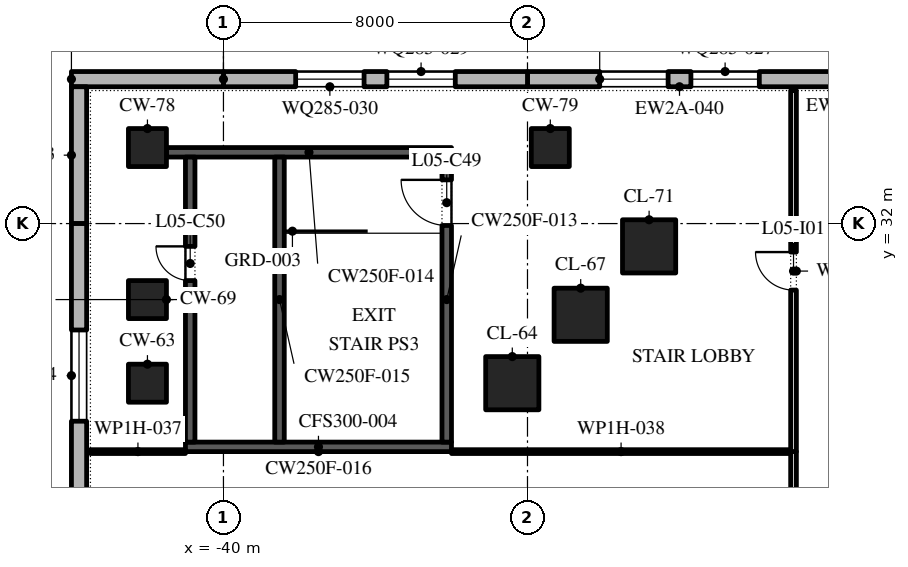
"""IFC4 building model, lengths in metres.
Left out: names, types, materials, properties, quantities, classifications, styles, units other than length and angle.
Written with IfcOpenShell. Run it as: python <this file> out.ifc"""

import sys

from ifc_helpers import new_model, si_unit, direction, frame, frame_2d, origin, origin_2d, place, context, subcontext, project, spatial, polyline, rectangle, outline, extrude, element, fill, save


model = new_model("IFC4")
c1 = context("Model", 3, precision=1e-05, world=origin(), true_north=direction((0.0, 1.0)))
c2 = subcontext(c1, "Body", "Model", "MODEL_VIEW")
j1 = project(units=[si_unit("LENGTHUNIT", "METRE"), si_unit("PLANEANGLEUNIT", "RADIAN")], contexts=[c1])
p1 = place(None, origin())
s1 = spatial("IfcSite", under=j1, at=p1, CompositionType="ELEMENT")
p2 = place(p1, origin())
s2 = spatial("IfcBuilding", under=s1, at=p2, CompositionType="ELEMENT")
p3 = place(p2, frame((0.0, 0.0, 28.8)))
s3 = spatial("IfcBuildingStorey", under=s2, at=p3, CompositionType="ELEMENT", Elevation=28.8)
p4 = place(p3, frame((-42.0, 27.8, 0.0), z_axis=(0.0, 0.0, 1.0), x_axis=(1.0, 0.0, 0.0)))
e1 = element("IfcColumn", 1, at=p4, inside=s3, PredefinedType="COLUMN", context=c2, shape_type="SweptSolid", body=[
    extrude(rectangle(XDim=1.0, YDim=1.0, at=origin_2d()), origin(), (0.0, 0.0, 1.0), 4.35),
])
for number, where, z_axis, x_axis in (
    (2, (-32.4, 27.8, 0.0), (0.0, 0.0, 1.0), (1.0, 0.0, 0.0)),
    (3, (-30.6, 29.6, 0.0), (0.0, 0.0, 1.0), (1.0, 0.0, 0.0)),
):
    element("IfcColumn", number, at=place(p3, frame(where, z_axis=z_axis, x_axis=x_axis)), inside=s3, PredefinedType="COLUMN", context=c2, shape_type="SweptSolid", body=[
        extrude(rectangle(XDim=1.4, YDim=1.4, at=origin_2d()), origin(), (0.0, 0.0, 1.0), 4.8),
    ])
p5 = place(p3, frame((-42.0, 30.0, 0.0), z_axis=(0.0, 0.0, 1.0), x_axis=(1.0, 0.0, 0.0)))
e4 = element("IfcColumn", 4, at=p5, inside=s3, PredefinedType="COLUMN", context=c2, shape_type="SweptSolid", body=[
    extrude(rectangle(XDim=1.0, YDim=1.0, at=origin_2d()), origin(), (0.0, 0.0, 1.0), 4.35),
])
p6 = place(p3, frame((-28.8, 31.4, 0.0), z_axis=(0.0, 0.0, 1.0), x_axis=(1.0, 0.0, 0.0)))
e5 = element("IfcColumn", 5, at=p6, inside=s3, PredefinedType="COLUMN", context=c2, shape_type="SweptSolid", body=[
    extrude(rectangle(XDim=1.4, YDim=1.4, at=origin_2d()), origin(), (0.0, 0.0, 1.0), 4.8),
])
for number, where, z_axis, x_axis in (
    (6, (-42.0, 34.0, 0.0), (0.0, 0.0, 1.0), (1.0, 0.0, 0.0)),
    (7, (-31.4, 34.0, 0.0), (0.0, 0.0, 1.0), (1.0, 0.0, 0.0)),
):
    element("IfcColumn", number, at=place(p3, frame(where, z_axis=z_axis, x_axis=x_axis)), inside=s3, PredefinedType="COLUMN", context=c2, shape_type="SweptSolid", body=[
        extrude(rectangle(XDim=1.0, YDim=1.0, at=origin_2d()), origin(), (0.0, 0.0, 1.0), 4.35),
    ])
p7 = place(p3, frame((-24.0, 35.8, 0.0), z_axis=(0.0, 0.0, 1.0), x_axis=(-1.0, 0.0, 0.0)))
e8 = element("IfcWall", 8, at=p7, inside=s3, PredefinedType="STANDARD", context=c2, shape_type="SweptSolid", body=[
    extrude(rectangle(XDim=8.0, YDim=0.4, at=frame_2d((4.0, 0.0))), origin(), (0.0, 0.0, 1.0), 4.35),
])
p8 = place(p7, frame((1.9, 0.0, 0.9)))
e9 = element("IfcOpeningElement", 9, at=p8, cuts=e8, PredefinedType="OPENING", context=c2, shape_type="SweptSolid", body=[
    extrude(outline(polyline([(0.0, 0.0), (1.8, 0.0), (1.8, 1.425), (1.784, 1.646), (1.738, 1.864), (1.661, 2.072), (1.556, 2.268), (1.425, 2.447), (1.269, 2.605), (1.093, 2.741), (0.9, 2.85), (0.707, 2.741), (0.531, 2.605), (0.375, 2.447), (0.244, 2.268), (0.139, 2.072), (0.062, 1.864), (0.016, 1.646), (0.0, 1.425), (0.0, 0.0)])), frame((0.0, 0.21, 0.0), z_axis=(0.0, -1.0, 0.0), x_axis=(1.0, 0.0, 0.0)), (0.0, 0.0, 1.0), 0.42),
])
p9 = place(p7, frame((4.3, 0.0, 0.9)))
e10 = element("IfcOpeningElement", 10, at=p9, cuts=e8, PredefinedType="OPENING", context=c2, shape_type="SweptSolid", body=[
    extrude(outline(polyline([(0.0, 0.0), (1.8, 0.0), (1.8, 1.425), (1.784, 1.646), (1.738, 1.864), (1.661, 2.072), (1.556, 2.268), (1.425, 2.447), (1.269, 2.605), (1.093, 2.741), (0.9, 2.85), (0.707, 2.741), (0.531, 2.605), (0.375, 2.447), (0.244, 2.268), (0.139, 2.072), (0.062, 1.864), (0.016, 1.646), (0.0, 1.425), (0.0, 0.0)])), frame((0.0, 0.21, 0.0), z_axis=(0.0, -1.0, 0.0), x_axis=(1.0, 0.0, 0.0)), (0.0, 0.0, 1.0), 0.42),
])
p10 = place(p3, frame((-32.0, 35.8, 0.0), z_axis=(0.0, 0.0, 1.0), x_axis=(-1.0, 0.0, 0.0)))
e11 = element("IfcWall", 11, at=p10, inside=s3, PredefinedType="STANDARD", context=c2, shape_type="SweptSolid", body=[
    extrude(rectangle(XDim=8.0, YDim=0.4, at=frame_2d((4.0, 0.0))), origin(), (0.0, 0.0, 1.0), 4.35),
])
p11 = place(p10, frame((1.9, 0.0, 0.9)))
e12 = element("IfcOpeningElement", 12, at=p11, cuts=e11, PredefinedType="OPENING", context=c2, shape_type="SweptSolid", body=[
    extrude(outline(polyline([(0.0, 0.0), (1.8, 0.0), (1.8, 1.425), (1.784, 1.646), (1.738, 1.864), (1.661, 2.072), (1.556, 2.268), (1.425, 2.447), (1.269, 2.605), (1.093, 2.741), (0.9, 2.85), (0.707, 2.741), (0.531, 2.605), (0.375, 2.447), (0.244, 2.268), (0.139, 2.072), (0.062, 1.864), (0.016, 1.646), (0.0, 1.425), (0.0, 0.0)])), frame((0.0, 0.21, 0.0), z_axis=(0.0, -1.0, 0.0), x_axis=(1.0, 0.0, 0.0)), (0.0, 0.0, 1.0), 0.42),
])
p12 = place(p10, frame((4.3, 0.0, 0.9)))
e13 = element("IfcOpeningElement", 13, at=p12, cuts=e11, PredefinedType="OPENING", context=c2, shape_type="SweptSolid", body=[
    extrude(outline(polyline([(0.0, 0.0), (1.8, 0.0), (1.8, 1.425), (1.784, 1.646), (1.738, 1.864), (1.661, 2.072), (1.556, 2.268), (1.425, 2.447), (1.269, 2.605), (1.093, 2.741), (0.9, 2.85), (0.707, 2.741), (0.531, 2.605), (0.375, 2.447), (0.244, 2.268), (0.139, 2.072), (0.062, 1.864), (0.016, 1.646), (0.0, 1.425), (0.0, 0.0)])), frame((0.0, 0.21, 0.0), z_axis=(0.0, -1.0, 0.0), x_axis=(1.0, 0.0, 0.0)), (0.0, 0.0, 1.0), 0.42),
])
p13 = place(p3, frame((-40.0, 35.8, 0.0), z_axis=(0.0, 0.0, 1.0), x_axis=(-1.0, 0.0, 0.0)))
e14 = element("IfcWall", 14, at=p13, inside=s3, PredefinedType="STANDARD", context=c2, shape_type="SweptSolid", body=[
    extrude(rectangle(XDim=4.0, YDim=0.4, at=frame_2d((2.0, 0.0))), origin(), (0.0, 0.0, 1.0), 4.35),
])
p14 = place(p3, frame((-43.8, 35.6, 0.0), z_axis=(0.0, 0.0, 1.0), x_axis=(0.0, -1.0, 0.0)))
e15 = element("IfcWall", 15, at=p14, inside=s3, PredefinedType="STANDARD", context=c2, shape_type="SweptSolid", body=[
    extrude(rectangle(XDim=3.6, YDim=0.4, at=frame_2d((1.8, 0.0))), origin(), (0.0, 0.0, 1.0), 4.35),
])
p15 = place(p3, frame((-43.8, 32.0, 0.0), z_axis=(0.0, 0.0, 1.0), x_axis=(0.0, -1.0, 0.0)))
e16 = element("IfcWall", 16, at=p15, inside=s3, PredefinedType="STANDARD", context=c2, shape_type="SweptSolid", body=[
    extrude(rectangle(XDim=8.0, YDim=0.4, at=frame_2d((4.0, 0.0))), origin(), (0.0, 0.0, 1.0), 4.35),
])
p16 = place(p15, frame((2.8, 0.0, 0.9)))
e17 = element("IfcOpeningElement", 17, at=p16, cuts=e16, PredefinedType="OPENING", context=c2, shape_type="SweptSolid", body=[
    extrude(outline(polyline([(0.0, 0.0), (2.4, 0.0), (2.4, 1.425), (2.378, 1.677), (2.312, 1.921), (2.205, 2.15), (2.06, 2.356), (1.881, 2.535), (1.674, 2.679), (1.444, 2.785), (1.2, 2.85), (0.956, 2.785), (0.726, 2.679), (0.519, 2.535), (0.34, 2.356), (0.195, 2.15), (0.088, 1.921), (0.022, 1.677), (0.0, 1.425), (0.0, 0.0)])), frame((0.0, 0.21, 0.0), z_axis=(0.0, -1.0, 0.0), x_axis=(1.0, 0.0, 0.0)), (0.0, 0.0, 1.0), 0.42),
])
p17 = place(p3, frame((-41.0, 26.125, 0.0), z_axis=(0.0, 0.0, 1.0), x_axis=(1.0, 0.0, 0.0)))
e18 = element("IfcWall", 18, at=p17, inside=s3, PredefinedType="SHEAR", context=c2, shape_type="SweptSolid", body=[
    extrude(rectangle(XDim=7.0, YDim=0.25, at=frame_2d((3.5, 0.0))), origin(), (0.0, 0.0, 1.0), 4.35),
])
p18 = place(p3, frame((-41.5, 33.875, 0.0), z_axis=(0.0, 0.0, 1.0), x_axis=(1.0, 0.0, 0.0)))
e19 = element("IfcWall", 19, at=p18, inside=s3, PredefinedType="SHEAR", context=c2, shape_type="SweptSolid", body=[
    extrude(rectangle(XDim=7.5, YDim=0.25, at=frame_2d((3.75, 0.0))), origin(), (0.0, 0.0, 1.0), 4.35),
])
p19 = place(p3, frame((-40.875, 26.25, 0.0), z_axis=(0.0, 0.0, 1.0), x_axis=(0.0, 1.0, 0.0)))
e20 = element("IfcWall", 20, at=p19, inside=s3, PredefinedType="SHEAR", context=c2, shape_type="SweptSolid", body=[
    extrude(rectangle(XDim=7.5, YDim=0.25, at=frame_2d((3.75, 0.0))), origin(), (0.0, 0.0, 1.0), 4.35),
])
p20 = place(p19, frame((4.25, 0.0, 0.0)))
e21 = element("IfcOpeningElement", 21, at=p20, cuts=e20, PredefinedType="OPENING", context=c2, shape_type="SweptSolid", body=[
    extrude(rectangle(XDim=0.9, YDim=2.1, at=frame_2d((0.45, 1.05))), frame((0.0, 0.135, 0.0), z_axis=(0.0, -1.0, 0.0), x_axis=(1.0, 0.0, 0.0)), (0.0, 0.0, 1.0), 0.27),
])
p21 = place(p3, frame((-34.125, 26.25, 0.0), z_axis=(0.0, 0.0, 1.0), x_axis=(0.0, 1.0, 0.0)))
e22 = element("IfcWall", 22, at=p21, inside=s3, PredefinedType="SHEAR", context=c2, shape_type="SweptSolid", body=[
    extrude(rectangle(XDim=7.5, YDim=0.25, at=frame_2d((3.75, 0.0))), origin(), (0.0, 0.0, 1.0), 4.35),
])
p22 = place(p21, frame((5.7, 0.0, 0.0)))
e23 = element("IfcOpeningElement", 23, at=p22, cuts=e22, PredefinedType="OPENING", context=c2, shape_type="SweptSolid", body=[
    extrude(rectangle(XDim=1.2, YDim=2.1, at=frame_2d((0.6, 1.05))), frame((0.0, 0.135, 0.0), z_axis=(0.0, -1.0, 0.0), x_axis=(1.0, 0.0, 0.0)), (0.0, 0.0, 1.0), 0.27),
])
p23 = place(p3, frame((-38.525, 26.25, 0.0), z_axis=(0.0, 0.0, 1.0), x_axis=(0.0, 1.0, 0.0)))
e24 = element("IfcWall", 24, at=p23, inside=s3, PredefinedType="SHEAR", context=c2, shape_type="SweptSolid", body=[
    extrude(rectangle(XDim=7.5, YDim=0.25, at=frame_2d((3.75, 0.0))), origin(), (0.0, 0.0, 1.0), 4.35),
])
p24 = place(p3, frame((-43.5, 26.0, 0.0), z_axis=(0.0, 0.0, 1.0), x_axis=(1.0, 0.0, 0.0)))
e25 = element("IfcWall", 25, at=p24, inside=s3, PredefinedType="PARTITIONING", context=c2, shape_type="SweptSolid", body=[
    extrude(rectangle(XDim=2.5, YDim=0.1, at=frame_2d((1.25, 0.0))), origin(), (0.0, 0.0, 1.0), 4.35),
])
p25 = place(p3, frame((-34.0, 26.0, 0.0), z_axis=(0.0, 0.0, 1.0), x_axis=(1.0, 0.0, 0.0)))
e26 = element("IfcWall", 26, at=p25, inside=s3, PredefinedType="PARTITIONING", context=c2, shape_type="SweptSolid", body=[
    extrude(rectangle(XDim=8.925, YDim=0.1, at=frame_2d((4.462, 0.0))), origin(), (0.0, 0.0, 1.0), 4.35),
])
p26 = place(p3, frame((-25.0, 18.0, 0.0), z_axis=(0.0, 0.0, 1.0), x_axis=(0.0, 1.0, 0.0)))
e27 = element("IfcWall", 27, at=p26, inside=s3, PredefinedType="PARTITIONING", context=c2, shape_type="SweptSolid", body=[
    extrude(rectangle(XDim=8.0, YDim=0.15, at=frame_2d((4.0, 0.0))), origin(), (0.0, 0.0, 1.0), 4.35),
])
p27 = place(p26, frame((3.5, 0.0, 0.0)))
e28 = element("IfcOpeningElement", 28, at=p27, cuts=e27, PredefinedType="OPENING", context=c2, shape_type="SweptSolid", body=[
    extrude(rectangle(XDim=1.0, YDim=2.1, at=frame_2d((0.5, 1.05))), frame((0.0, 0.085, 0.0), z_axis=(0.0, -1.0, 0.0), x_axis=(1.0, 0.0, 0.0)), (0.0, 0.0, 1.0), 0.17),
])
p28 = place(p3, frame((-25.0, 26.0, 0.0), z_axis=(0.0, 0.0, 1.0), x_axis=(0.0, 1.0, 0.0)))
e29 = element("IfcWall", 29, at=p28, inside=s3, PredefinedType="PARTITIONING", context=c2, shape_type="SweptSolid", body=[
    extrude(rectangle(XDim=9.5, YDim=0.15, at=frame_2d((4.75, 0.0))), origin(), (0.0, 0.0, 1.0), 4.35),
])
p29 = place(p28, frame((4.25, 0.0, 0.0)))
e30 = element("IfcOpeningElement", 30, at=p29, cuts=e29, PredefinedType="OPENING", context=c2, shape_type="SweptSolid", body=[
    extrude(rectangle(XDim=1.0, YDim=2.1, at=frame_2d((0.5, 1.05))), frame((0.0, 0.085, 0.0), z_axis=(0.0, -1.0, 0.0), x_axis=(1.0, 0.0, 0.0)), (0.0, 0.0, 1.0), 0.17),
])
p30 = place(p8, origin())
e31 = element("IfcWindow", 31, at=p30, inside=s3, PartitioningType="DOUBLE_PANEL_VERTICAL", PredefinedType="WINDOW", context=c2, shape_type="SweptSolid", body=[
    extrude(outline(polyline([(0.0, 0.0), (1.8, 0.0), (1.8, 1.425), (1.784, 1.646), (1.738, 1.864), (1.661, 2.072), (1.556, 2.268), (1.425, 2.447), (1.269, 2.605), (1.093, 2.741), (0.9, 2.85), (0.707, 2.741), (0.531, 2.605), (0.375, 2.447), (0.244, 2.268), (0.139, 2.072), (0.062, 1.864), (0.016, 1.646), (0.0, 1.425), (0.0, 0.0)])), frame((0.0, 0.03, 0.0), z_axis=(0.0, -1.0, 0.0), x_axis=(1.0, 0.0, 0.0)), (0.0, 0.0, 1.0), 0.06),
])
fill(e9, e31)
p31 = place(p9, origin())
e32 = element("IfcWindow", 32, at=p31, inside=s3, PartitioningType="DOUBLE_PANEL_VERTICAL", PredefinedType="WINDOW", context=c2, shape_type="SweptSolid", body=[
    extrude(outline(polyline([(0.0, 0.0), (1.8, 0.0), (1.8, 1.425), (1.784, 1.646), (1.738, 1.864), (1.661, 2.072), (1.556, 2.268), (1.425, 2.447), (1.269, 2.605), (1.093, 2.741), (0.9, 2.85), (0.707, 2.741), (0.531, 2.605), (0.375, 2.447), (0.244, 2.268), (0.139, 2.072), (0.062, 1.864), (0.016, 1.646), (0.0, 1.425), (0.0, 0.0)])), frame((0.0, 0.03, 0.0), z_axis=(0.0, -1.0, 0.0), x_axis=(1.0, 0.0, 0.0)), (0.0, 0.0, 1.0), 0.06),
])
fill(e10, e32)
p32 = place(p11, origin())
e33 = element("IfcWindow", 33, at=p32, inside=s3, PartitioningType="DOUBLE_PANEL_VERTICAL", PredefinedType="WINDOW", context=c2, shape_type="SweptSolid", body=[
    extrude(outline(polyline([(0.0, 0.0), (1.8, 0.0), (1.8, 1.425), (1.784, 1.646), (1.738, 1.864), (1.661, 2.072), (1.556, 2.268), (1.425, 2.447), (1.269, 2.605), (1.093, 2.741), (0.9, 2.85), (0.707, 2.741), (0.531, 2.605), (0.375, 2.447), (0.244, 2.268), (0.139, 2.072), (0.062, 1.864), (0.016, 1.646), (0.0, 1.425), (0.0, 0.0)])), frame((0.0, 0.03, 0.0), z_axis=(0.0, -1.0, 0.0), x_axis=(1.0, 0.0, 0.0)), (0.0, 0.0, 1.0), 0.06),
])
fill(e12, e33)
p33 = place(p12, origin())
e34 = element("IfcWindow", 34, at=p33, inside=s3, PartitioningType="DOUBLE_PANEL_VERTICAL", PredefinedType="WINDOW", context=c2, shape_type="SweptSolid", body=[
    extrude(outline(polyline([(0.0, 0.0), (1.8, 0.0), (1.8, 1.425), (1.784, 1.646), (1.738, 1.864), (1.661, 2.072), (1.556, 2.268), (1.425, 2.447), (1.269, 2.605), (1.093, 2.741), (0.9, 2.85), (0.707, 2.741), (0.531, 2.605), (0.375, 2.447), (0.244, 2.268), (0.139, 2.072), (0.062, 1.864), (0.016, 1.646), (0.0, 1.425), (0.0, 0.0)])), frame((0.0, 0.03, 0.0), z_axis=(0.0, -1.0, 0.0), x_axis=(1.0, 0.0, 0.0)), (0.0, 0.0, 1.0), 0.06),
])
fill(e13, e34)
p34 = place(p16, origin())
e35 = element("IfcWindow", 35, at=p34, inside=s3, PartitioningType="DOUBLE_PANEL_VERTICAL", PredefinedType="WINDOW", context=c2, shape_type="SweptSolid", body=[
    extrude(outline(polyline([(0.0, 0.0), (2.4, 0.0), (2.4, 1.425), (2.378, 1.677), (2.312, 1.921), (2.205, 2.15), (2.06, 2.356), (1.881, 2.535), (1.674, 2.679), (1.444, 2.785), (1.2, 2.85), (0.956, 2.785), (0.726, 2.679), (0.519, 2.535), (0.34, 2.356), (0.195, 2.15), (0.088, 1.921), (0.022, 1.677), (0.0, 1.425), (0.0, 0.0)])), frame((0.0, 0.03, 0.0), z_axis=(0.0, -1.0, 0.0), x_axis=(1.0, 0.0, 0.0)), (0.0, 0.0, 1.0), 0.06),
])
fill(e17, e35)
p35 = place(p22, origin())
e36 = element("IfcDoor", 36, at=p35, inside=s3, OperationType="SINGLE_SWING_LEFT", PredefinedType="DOOR", context=c2, shape_type="SweptSolid", body=[
    extrude(rectangle(XDim=1.2, YDim=2.1, at=frame_2d((0.6, 1.05))), frame((0.0, 0.025, 0.0), z_axis=(0.0, -1.0, 0.0), x_axis=(1.0, 0.0, 0.0)), (0.0, 0.0, 1.0), 0.05),
])
fill(e23, e36)
p36 = place(p20, origin())
e37 = element("IfcDoor", 37, at=p36, inside=s3, OperationType="SINGLE_SWING_LEFT", PredefinedType="DOOR", context=c2, shape_type="SweptSolid", body=[
    extrude(rectangle(XDim=0.9, YDim=2.1, at=frame_2d((0.45, 1.05))), frame((0.0, -0.075, 0.0), z_axis=(0.0, -1.0, 0.0), x_axis=(1.0, 0.0, 0.0)), (0.0, 0.0, 1.0), 0.05),
])
fill(e21, e37)
p37 = place(p29, origin())
e38 = element("IfcDoor", 38, at=p37, inside=s3, OperationType="SINGLE_SWING_LEFT", PredefinedType="DOOR", context=c2, shape_type="SweptSolid", body=[
    extrude(rectangle(XDim=1.0, YDim=2.1, at=frame_2d((0.5, 1.05))), frame((0.0, 0.025, 0.0), z_axis=(0.0, -1.0, 0.0), x_axis=(1.0, 0.0, 0.0)), (0.0, 0.0, 1.0), 0.05),
])
fill(e30, e38)
save(model, sys.argv[1])
